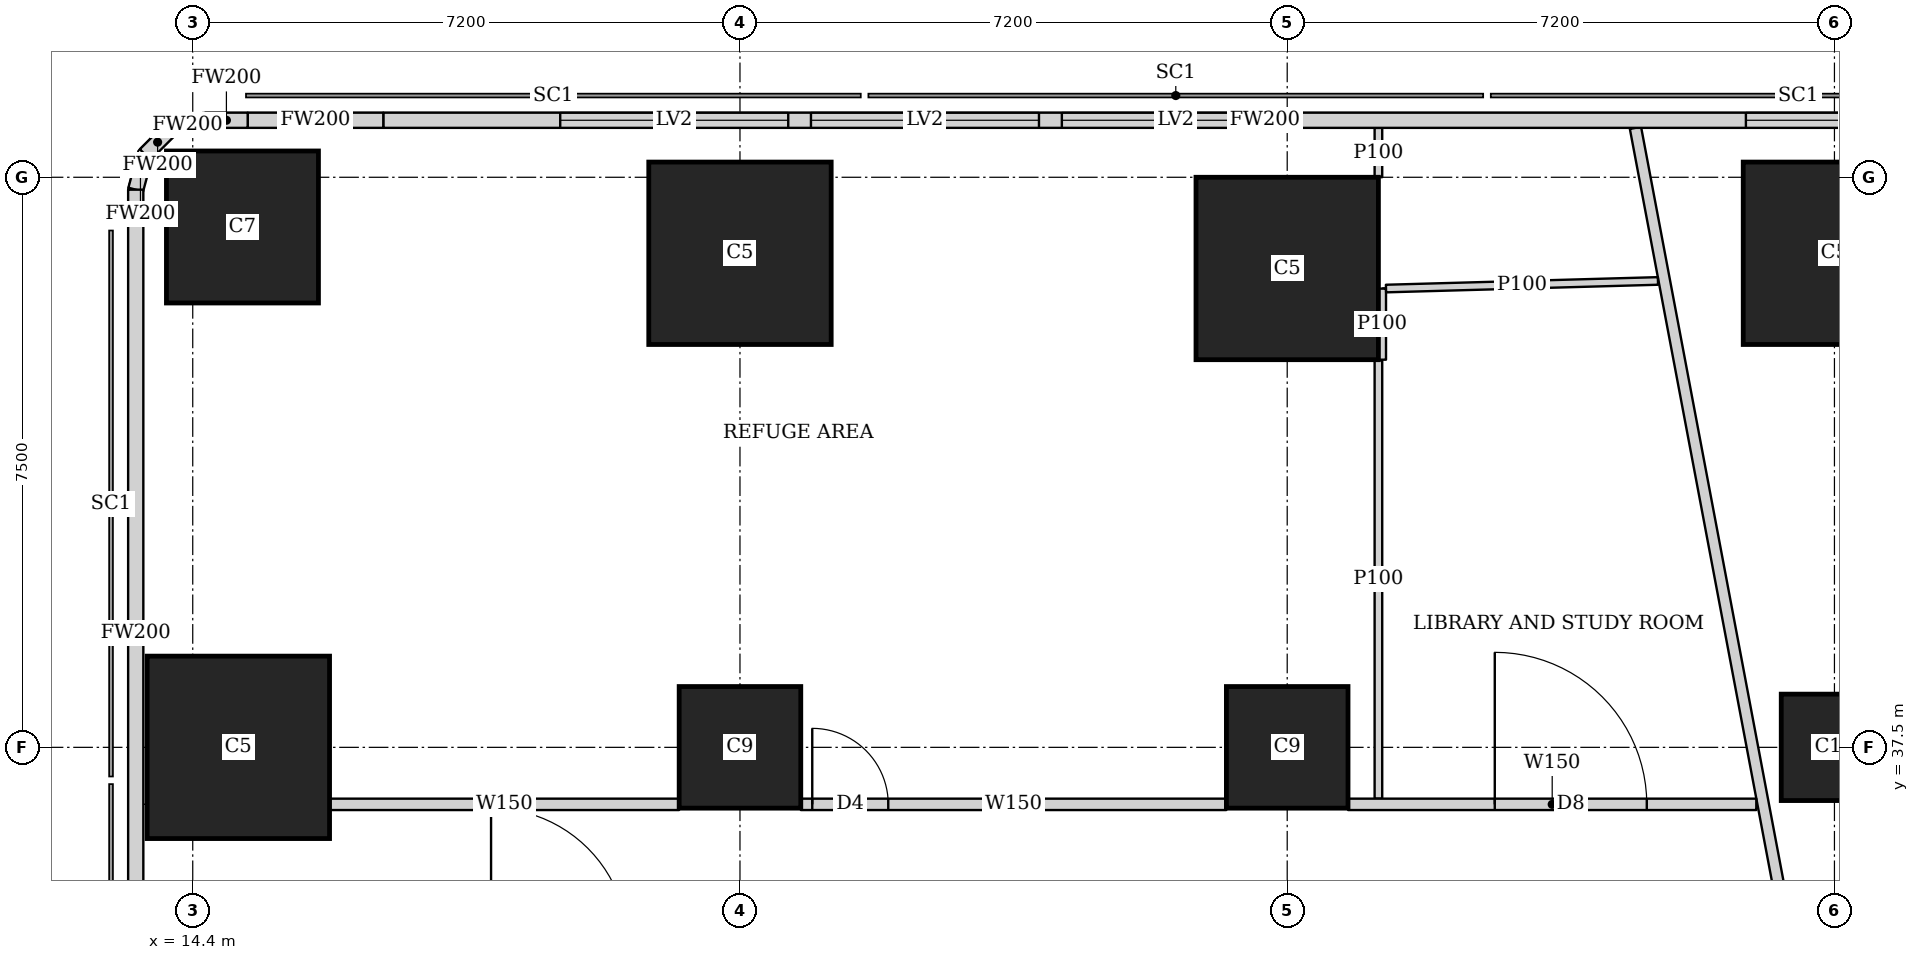
"""IFC4 building model, lengths in metres.
Left out: names, types, materials, properties, quantities, classifications, styles, units other than length and angle.
Written with IfcOpenShell. Run it as: python <this file> out.ifc"""

import sys

from ifc_helpers import new_model, si_unit, direction, frame, frame_2d, origin, origin_2d, place, context, subcontext, project, spatial, rectangle, extrude, element, fill, save


model = new_model("IFC4")
c1 = context("Model", 3, precision=1e-05, world=origin(), true_north=direction((0.0, 1.0)))
c2 = subcontext(c1, "Body", "Model", "MODEL_VIEW")
j1 = project(units=[si_unit("LENGTHUNIT", "METRE"), si_unit("PLANEANGLEUNIT", "RADIAN")], contexts=[c1])
p1 = place(None, origin())
s1 = spatial("IfcSite", under=j1, at=p1, CompositionType="ELEMENT")
p2 = place(p1, origin())
s2 = spatial("IfcBuilding", under=s1, at=p2, CompositionType="ELEMENT")
p3 = place(p2, frame((0.0, 0.0, 246.2)))
s3 = spatial("IfcBuildingStorey", under=s2, at=p3, CompositionType="ELEMENT", Elevation=246.2)
p4 = place(p3, frame((15.0, 37.5, 0.0), z_axis=(0.0, 0.0, 1.0), x_axis=(1.0, 0.0, 0.0)))
e1 = element("IfcColumn", 1, at=p4, inside=s3, PredefinedType="COLUMN", context=c2, shape_type="SweptSolid", body=[
    extrude(rectangle(XDim=2.4, YDim=2.4, at=origin_2d()), origin(), (0.0, 0.0, 1.0), 5.4),
])
for number, where, z_axis, x_axis in (
    (2, (21.6, 37.5, 0.0), (0.0, 0.0, 1.0), (1.0, 0.0, 0.0)),
    (3, (28.8, 37.5, 0.0), (0.0, 0.0, 1.0), (1.0, 0.0, 0.0)),
):
    element("IfcColumn", number, at=place(p3, frame(where, z_axis=z_axis, x_axis=x_axis)), inside=s3, PredefinedType="COLUMN", context=c2, shape_type="SweptSolid", body=[
        extrude(rectangle(XDim=1.6, YDim=1.6, at=origin_2d()), origin(), (0.0, 0.0, 1.0), 5.4),
    ])
p5 = place(p3, frame((36.0, 37.5, 0.0), z_axis=(0.0, 0.0, 1.0), x_axis=(1.0, 0.0, 0.0)))
e4 = element("IfcColumn", 4, at=p5, inside=s3, PredefinedType="COLUMN", context=c2, shape_type="SweptSolid", body=[
    extrude(rectangle(XDim=1.4, YDim=1.4, at=origin_2d()), origin(), (0.0, 0.0, 1.0), 5.4),
])
p6 = place(p3, frame((15.054, 44.346, 0.0), z_axis=(0.0, 0.0, 1.0), x_axis=(1.0, 0.0, 0.0)))
e5 = element("IfcColumn", 5, at=p6, inside=s3, PredefinedType="COLUMN", context=c2, shape_type="SweptSolid", body=[
    extrude(rectangle(XDim=2.0, YDim=2.0, at=origin_2d()), origin(), (0.0, 0.0, 1.0), 5.15),
])
for number, where, z_axis, x_axis in (
    (6, (21.6, 44.0, 0.0), (0.0, 0.0, 1.0), (1.0, 0.0, 0.0)),
    (7, (28.8, 43.8, 0.0), (0.0, 0.0, 1.0), (1.0, 0.0, 0.0)),
    (8, (36.0, 44.0, 0.0), (0.0, 0.0, 1.0), (1.0, 0.0, 0.0)),
):
    element("IfcColumn", number, at=place(p3, frame(where, z_axis=z_axis, x_axis=x_axis)), inside=s3, PredefinedType="COLUMN", context=c2, shape_type="SweptSolid", body=[
        extrude(rectangle(XDim=2.4, YDim=2.4, at=origin_2d()), origin(), (0.0, 0.0, 1.0), 5.15),
    ])
p7 = place(p3, frame((40.106, 45.75, 0.0), z_axis=(0.0, 0.0, 1.0), x_axis=(-1.0, 0.0, 0.0)))
e9 = element("IfcWall", 9, at=p7, inside=s3, PredefinedType="SOLIDWALL", context=c2, shape_type="SweptSolid", body=[
    extrude(rectangle(XDim=23.199, YDim=0.2, at=frame_2d((11.6, 0.0))), origin(), (0.0, 0.0, 1.0), 5.15),
])
p8 = place(p7, frame((2.271, 0.0, 0.6)))
e10 = element("IfcOpeningElement", 10, at=p8, cuts=e9, PredefinedType="OPENING", context=c2, shape_type="SweptSolid", body=[
    extrude(rectangle(XDim=3.0, YDim=2.7, at=frame_2d((1.5, 1.35))), frame((0.0, 0.11, 0.0), z_axis=(0.0, -1.0, 0.0), x_axis=(1.0, 0.0, 0.0)), (0.0, 0.0, 1.0), 0.22),
])
p9 = place(p7, frame((11.271, 0.0, 0.6)))
e11 = element("IfcOpeningElement", 11, at=p9, cuts=e9, PredefinedType="OPENING", context=c2, shape_type="SweptSolid", body=[
    extrude(rectangle(XDim=3.0, YDim=2.7, at=frame_2d((1.5, 1.35))), frame((0.0, 0.11, 0.0), z_axis=(0.0, -1.0, 0.0), x_axis=(1.0, 0.0, 0.0)), (0.0, 0.0, 1.0), 0.22),
])
p10 = place(p7, frame((14.572, 0.0, 0.6)))
e12 = element("IfcOpeningElement", 12, at=p10, cuts=e9, PredefinedType="OPENING", context=c2, shape_type="SweptSolid", body=[
    extrude(rectangle(XDim=3.0, YDim=2.7, at=frame_2d((1.5, 1.35))), frame((0.0, 0.11, 0.0), z_axis=(0.0, -1.0, 0.0), x_axis=(1.0, 0.0, 0.0)), (0.0, 0.0, 1.0), 0.22),
])
p11 = place(p7, frame((17.871, 0.0, 0.6)))
e13 = element("IfcOpeningElement", 13, at=p11, cuts=e9, PredefinedType="OPENING", context=c2, shape_type="SweptSolid", body=[
    extrude(rectangle(XDim=3.0, YDim=2.7, at=frame_2d((1.5, 1.35))), frame((0.0, 0.11, 0.0), z_axis=(0.0, -1.0, 0.0), x_axis=(1.0, 0.0, 0.0)), (0.0, 0.0, 1.0), 0.22),
])
p12 = place(p3, frame((16.907, 45.75, 0.0), z_axis=(0.0, 0.0, 1.0), x_axis=(-1.0, 0.0, 0.0)))
e14 = element("IfcWall", 14, at=p12, inside=s3, PredefinedType="SOLIDWALL", context=c2, shape_type="SweptSolid", body=[
    extrude(rectangle(XDim=1.784, YDim=0.2, at=frame_2d((0.892, 0.0))), origin(), (0.0, 0.0, 1.0), 3.35),
])
p13 = place(p3, frame((15.123, 45.75, 0.0), z_axis=(0.0, 0.0, 1.0), x_axis=(-1.0, 0.0, 0.0)))
e15 = element("IfcWall", 15, at=p13, inside=s3, PredefinedType="SOLIDWALL", context=c2, shape_type="SweptSolid", body=[
    extrude(rectangle(XDim=0.56, YDim=0.2, at=frame_2d((0.28, 0.0))), origin(), (0.0, 0.0, 1.0), 5.15),
])
p14 = place(p3, frame((14.563, 45.75, 0.0), z_axis=(0.0, 0.0, 1.0), x_axis=(-0.965655254015, -0.259826731483, 0.0)))
e16 = element("IfcWall", 16, at=p14, inside=s3, PredefinedType="SOLIDWALL", context=c2, shape_type="SweptSolid", body=[
    extrude(rectangle(XDim=0.477, YDim=0.2, at=frame_2d((0.239, 0.0))), origin(), (0.0, 0.0, 1.0), 5.15),
])
p15 = place(p3, frame((14.102, 45.626, 0.0), z_axis=(0.0, 0.0, 1.0), x_axis=(-0.707369890659, -0.706843573776, 0.0)))
e17 = element("IfcWall", 17, at=p15, inside=s3, PredefinedType="SOLIDWALL", context=c2, shape_type="SweptSolid", body=[
    extrude(rectangle(XDim=0.464, YDim=0.2, at=frame_2d((0.232, 0.0))), origin(), (0.0, 0.0, 1.0), 5.15),
])
p16 = place(p3, frame((13.774, 45.298, 0.0), z_axis=(0.0, 0.0, 1.0), x_axis=(-0.259698463175, -0.965689757751, 0.0)))
e18 = element("IfcWall", 18, at=p16, inside=s3, PredefinedType="SOLIDWALL", context=c2, shape_type="SweptSolid", body=[
    extrude(rectangle(XDim=0.478, YDim=0.2, at=frame_2d((0.239, 0.0))), origin(), (0.0, 0.0, 1.0), 5.15),
])
p17 = place(p3, frame((13.65, 44.837, 0.0), z_axis=(0.0, 0.0, 1.0), x_axis=(0.0, -1.0, 0.0)))
e19 = element("IfcWall", 19, at=p17, inside=s3, PredefinedType="SOLIDWALL", context=c2, shape_type="SweptSolid", body=[
    extrude(rectangle(XDim=11.676, YDim=0.2, at=frame_2d((5.838, 0.0))), origin(), (0.0, 0.0, 1.0), 5.15),
])
p18 = place(p3, frame((16.201, 36.75, 0.0), z_axis=(0.0, 0.0, 1.0), x_axis=(1.0, 0.0, 0.0)))
e20 = element("IfcWall", 20, at=p18, inside=s3, PredefinedType="SOLIDWALL", context=c2, shape_type="SweptSolid", body=[
    extrude(rectangle(XDim=4.598, YDim=0.15, at=frame_2d((2.299, 0.0))), origin(), (0.0, 0.0, 1.0), 2.75),
])
p19 = place(p3, frame((22.401, 36.75, 0.0), z_axis=(0.0, 0.0, 1.0), x_axis=(1.0, 0.0, 0.0)))
e21 = element("IfcWall", 21, at=p19, inside=s3, PredefinedType="SOLIDWALL", context=c2, shape_type="SweptSolid", body=[
    extrude(rectangle(XDim=5.598, YDim=0.15, at=frame_2d((2.799, 0.0))), origin(), (0.0, 0.0, 1.0), 2.75),
])
p20 = place(p19, frame((0.15, 0.0, 0.0)))
e22 = element("IfcOpeningElement", 22, at=p20, cuts=e21, PredefinedType="OPENING", context=c2, shape_type="SweptSolid", body=[
    extrude(rectangle(XDim=1.0, YDim=2.1, at=frame_2d((0.5, 1.05))), frame((0.0, 0.085, 0.0), z_axis=(0.0, -1.0, 0.0), x_axis=(1.0, 0.0, 0.0)), (0.0, 0.0, 1.0), 0.17),
])
p21 = place(p3, frame((29.601, 36.75, 0.0), z_axis=(0.0, 0.0, 1.0), x_axis=(1.0, 0.0, 0.0)))
e23 = element("IfcWall", 23, at=p21, inside=s3, PredefinedType="SOLIDWALL", context=c2, shape_type="SweptSolid", body=[
    extrude(rectangle(XDim=5.371, YDim=0.15, at=frame_2d((2.686, 0.0))), origin(), (0.0, 0.0, 1.0), 2.75),
])
p22 = place(p21, frame((1.93, 0.0, 0.0)))
e24 = element("IfcOpeningElement", 24, at=p22, cuts=e23, PredefinedType="OPENING", context=c2, shape_type="SweptSolid", body=[
    extrude(rectangle(XDim=2.0, YDim=2.1, at=frame_2d((1.0, 1.05))), frame((0.0, 0.085, 0.0), z_axis=(0.0, -1.0, 0.0), x_axis=(1.0, 0.0, 0.0)), (0.0, 0.0, 1.0), 0.17),
])
p23 = place(p3, frame((33.382, 45.65, 0.0), z_axis=(0.0, 0.0, 1.0), x_axis=(0.185582712124, -0.982628646519, 0.0)))
e25 = element("IfcWall", 25, at=p23, inside=s3, PredefinedType="SOLIDWALL", context=c2, shape_type="SweptSolid", body=[
    extrude(rectangle(XDim=46.044, YDim=0.15, at=frame_2d((23.022, 0.0))), origin(), (0.0, 0.0, 1.0), 3.35),
])
p24 = place(p23, frame((24.35, 0.0, 0.0)))
e26 = element("IfcOpeningElement", 26, at=p24, cuts=e25, PredefinedType="OPENING", context=c2, shape_type="SweptSolid", body=[
    extrude(rectangle(XDim=1.0, YDim=2.1, at=frame_2d((0.5, 1.05))), frame((0.0, 0.085, 0.0), z_axis=(0.0, -1.0, 0.0), x_axis=(1.0, 0.0, 0.0)), (0.0, 0.0, 1.0), 0.17),
])
p25 = place(p3, frame((30.0, 36.825, 0.0), z_axis=(0.0, 0.0, 1.0), x_axis=(0.0, 1.0, 0.0)))
e27 = element("IfcWall", 27, at=p25, inside=s3, PredefinedType="PARTITIONING", context=c2, shape_type="SweptSolid", body=[
    extrude(rectangle(XDim=5.774, YDim=0.1, at=frame_2d((2.887, 0.0))), origin(), (0.0, 0.0, 1.0), 3.55),
])
p26 = place(p3, frame((30.0, 45.001, 0.0), z_axis=(0.0, 0.0, 1.0), x_axis=(0.0, 1.0, 0.0)))
e28 = element("IfcWall", 28, at=p26, inside=s3, PredefinedType="PARTITIONING", context=c2, shape_type="SweptSolid", body=[
    extrude(rectangle(XDim=0.649, YDim=0.1, at=frame_2d((0.324, 0.0))), origin(), (0.0, 0.0, 1.0), 5.15),
])
p27 = place(p3, frame((30.05, 42.6, 0.0), z_axis=(0.0, 0.0, 1.0), x_axis=(0.0, 1.0, 0.0)))
e29 = element("IfcWall", 29, at=p27, inside=s3, PredefinedType="PARTITIONING", context=c2, shape_type="SweptSolid", body=[
    extrude(rectangle(XDim=0.935, YDim=0.1, at=frame_2d((0.467, 0.0))), origin(), (0.0, 0.0, 1.0), 3.35),
])
p28 = place(p3, frame((30.1, 43.536, 0.0), z_axis=(0.0, 0.0, 1.0), x_axis=(0.999608878922, 0.027965857411, 0.0)))
e30 = element("IfcWall", 30, at=p28, inside=s3, PredefinedType="PARTITIONING", context=c2, shape_type="SweptSolid", body=[
    extrude(rectangle(XDim=3.579, YDim=0.1, at=frame_2d((1.79, 0.0))), origin(), (0.0, 0.0, 1.0), 3.35),
])
p29 = place(p8, origin())
e31 = element("IfcWindow", 31, at=p29, inside=s3, PartitioningType="SINGLE_PANEL", PredefinedType="USERDEFINED", context=c2, shape_type="SweptSolid", body=[
    extrude(rectangle(XDim=3.0, YDim=2.7, at=frame_2d((1.5, 1.35))), frame((0.0, 0.03, 0.0), z_axis=(0.0, -1.0, 0.0), x_axis=(1.0, 0.0, 0.0)), (0.0, 0.0, 1.0), 0.06),
])
fill(e10, e31)
p30 = place(p9, origin())
e32 = element("IfcWindow", 32, at=p30, inside=s3, PartitioningType="SINGLE_PANEL", PredefinedType="USERDEFINED", context=c2, shape_type="SweptSolid", body=[
    extrude(rectangle(XDim=3.0, YDim=2.7, at=frame_2d((1.5, 1.35))), frame((0.0, 0.03, 0.0), z_axis=(0.0, -1.0, 0.0), x_axis=(1.0, 0.0, 0.0)), (0.0, 0.0, 1.0), 0.06),
])
fill(e11, e32)
p31 = place(p10, origin())
e33 = element("IfcWindow", 33, at=p31, inside=s3, PartitioningType="SINGLE_PANEL", PredefinedType="USERDEFINED", context=c2, shape_type="SweptSolid", body=[
    extrude(rectangle(XDim=3.0, YDim=2.7, at=frame_2d((1.5, 1.35))), frame((0.0, 0.03, 0.0), z_axis=(0.0, -1.0, 0.0), x_axis=(1.0, 0.0, 0.0)), (0.0, 0.0, 1.0), 0.06),
])
fill(e12, e33)
p32 = place(p11, origin())
e34 = element("IfcWindow", 34, at=p32, inside=s3, PartitioningType="SINGLE_PANEL", PredefinedType="USERDEFINED", context=c2, shape_type="SweptSolid", body=[
    extrude(rectangle(XDim=3.0, YDim=2.7, at=frame_2d((1.5, 1.35))), frame((0.0, 0.03, 0.0), z_axis=(0.0, -1.0, 0.0), x_axis=(1.0, 0.0, 0.0)), (0.0, 0.0, 1.0), 0.06),
])
fill(e13, e34)
p33 = place(p20, origin())
e35 = element("IfcDoor", 35, at=p33, inside=s3, OperationType="SINGLE_SWING_LEFT", PredefinedType="DOOR", context=c2, shape_type="SweptSolid", body=[
    extrude(rectangle(XDim=1.0, YDim=2.1, at=frame_2d((0.5, 1.05))), frame((0.0, 0.025, 0.0), z_axis=(0.0, -1.0, 0.0), x_axis=(1.0, 0.0, 0.0)), (0.0, 0.0, 1.0), 0.05),
])
fill(e22, e35)
p34 = place(p22, origin())
e36 = element("IfcDoor", 36, at=p34, inside=s3, OperationType="DOUBLE_DOOR_SINGLE_SWING", PredefinedType="DOOR", context=c2, shape_type="SweptSolid", body=[
    extrude(rectangle(XDim=2.0, YDim=2.1, at=frame_2d((1.0, 1.05))), frame((0.0, 0.025, 0.0), z_axis=(0.0, -1.0, 0.0), x_axis=(1.0, 0.0, 0.0)), (0.0, 0.0, 1.0), 0.05),
])
fill(e24, e36)
save(model, sys.argv[1])
